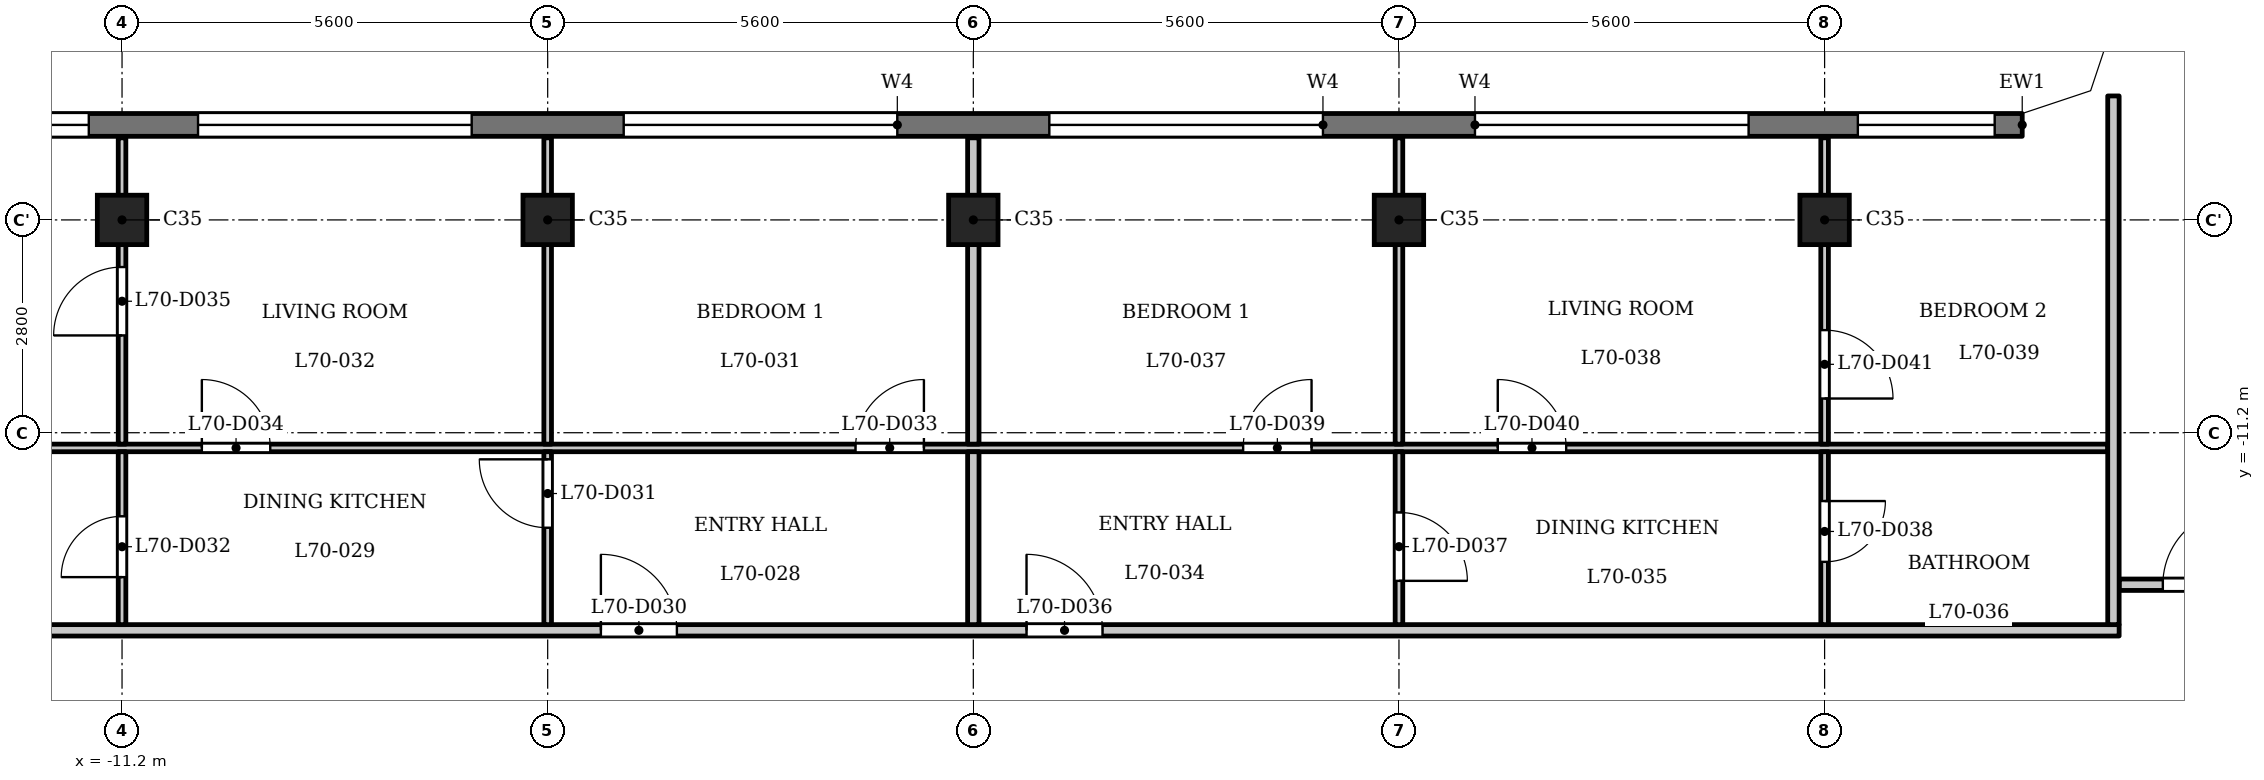
"""IFC4 building model, lengths in metres.
Left out: names, types, materials, properties, quantities, classifications, styles, units other than length and angle.
Written with IfcOpenShell. Run it as: python <this file> out.ifc"""

import sys

from ifc_helpers import new_model, si_unit, direction, frame, frame_2d, origin, origin_2d, place, context, subcontext, project, spatial, polyline, rectangle, outline, extrude, element, fill, save


model = new_model("IFC4")
c1 = context("Model", 3, precision=1e-05, world=origin(), true_north=direction((0.0, 1.0)))
c2 = subcontext(c1, "Body", "Model", "MODEL_VIEW")
j1 = project(units=[si_unit("LENGTHUNIT", "METRE"), si_unit("PLANEANGLEUNIT", "RADIAN")], contexts=[c1])
p1 = place(None, origin())
s1 = spatial("IfcSite", under=j1, at=p1, CompositionType="ELEMENT")
p2 = place(p1, origin())
s2 = spatial("IfcBuilding", under=s1, at=p2, CompositionType="ELEMENT")
p3 = place(p2, frame((0.0, 0.0, 269.7)))
s3 = spatial("IfcBuildingStorey", under=s2, at=p3, CompositionType="ELEMENT", Elevation=269.7)
for number, where, z_axis, x_axis in (
    (1, (-11.2, -8.4, 0.0), (0.0, 0.0, 1.0), (1.0, 0.0, 0.0)),
    (2, (-5.6, -8.4, 0.0), (0.0, 0.0, 1.0), (1.0, 0.0, 0.0)),
    (3, (0.0, -8.4, 0.0), (0.0, 0.0, 1.0), (1.0, 0.0, 0.0)),
    (4, (5.6, -8.4, 0.0), (0.0, 0.0, 1.0), (1.0, 0.0, 0.0)),
    (5, (11.2, -8.4, 0.0), (0.0, 0.0, 1.0), (1.0, 0.0, 0.0)),
):
    element("IfcColumn", number, at=place(p3, frame(where, z_axis=z_axis, x_axis=x_axis)), inside=s3, PredefinedType="COLUMN", context=c2, shape_type="SweptSolid", body=[
        extrude(rectangle(XDim=0.65, YDim=0.65, at=origin_2d()), origin(), (0.0, 0.0, 1.0), 3.5),
    ])
p4 = place(p3, frame((13.8, -7.15, 0.0), z_axis=(0.0, 0.0, 1.0), x_axis=(-1.0, 0.0, 0.0)))
e6 = element("IfcWall", 6, at=p4, inside=s3, PredefinedType="SOLIDWALL", context=c2, shape_type="SweptSolid", body=[
    extrude(rectangle(XDim=27.6, YDim=0.3, at=frame_2d((13.8, 0.0))), origin(), (0.0, 0.0, 1.0), 3.2),
])
p5 = place(p4, frame((0.363, 0.0, 0.9)))
e7 = element("IfcOpeningElement", 7, at=p5, cuts=e6, PredefinedType="OPENING", context=c2, shape_type="SweptSolid", body=[
    extrude(rectangle(XDim=1.8, YDim=1.25, at=frame_2d((0.9, 0.625))), frame((0.0, 0.16, 0.0), z_axis=(0.0, -1.0, 0.0), x_axis=(1.0, 0.0, 0.0)), (0.0, 0.0, 1.0), 0.32),
])
p6 = place(p4, frame((3.6, 0.0, 1.2)))
e8 = element("IfcOpeningElement", 8, at=p6, cuts=e6, PredefinedType="OPENING", context=c2, shape_type="SweptSolid", body=[
    extrude(rectangle(XDim=3.6, YDim=0.95, at=frame_2d((1.8, 0.475))), frame((0.0, 0.16, 0.0), z_axis=(0.0, -1.0, 0.0), x_axis=(1.0, 0.0, 0.0)), (0.0, 0.0, 1.0), 0.32),
])
p7 = place(p4, frame((9.2, 0.0, 1.2)))
e9 = element("IfcOpeningElement", 9, at=p7, cuts=e6, PredefinedType="OPENING", context=c2, shape_type="SweptSolid", body=[
    extrude(rectangle(XDim=3.6, YDim=0.95, at=frame_2d((1.8, 0.475))), frame((0.0, 0.16, 0.0), z_axis=(0.0, -1.0, 0.0), x_axis=(1.0, 0.0, 0.0)), (0.0, 0.0, 1.0), 0.32),
])
p8 = place(p4, frame((14.8, 0.0, 1.2)))
e10 = element("IfcOpeningElement", 10, at=p8, cuts=e6, PredefinedType="OPENING", context=c2, shape_type="SweptSolid", body=[
    extrude(rectangle(XDim=3.6, YDim=0.95, at=frame_2d((1.8, 0.475))), frame((0.0, 0.16, 0.0), z_axis=(0.0, -1.0, 0.0), x_axis=(1.0, 0.0, 0.0)), (0.0, 0.0, 1.0), 0.32),
])
p9 = place(p4, frame((20.4, 0.0, 1.2)))
e11 = element("IfcOpeningElement", 11, at=p9, cuts=e6, PredefinedType="OPENING", context=c2, shape_type="SweptSolid", body=[
    extrude(rectangle(XDim=3.6, YDim=0.95, at=frame_2d((1.8, 0.475))), frame((0.0, 0.16, 0.0), z_axis=(0.0, -1.0, 0.0), x_axis=(1.0, 0.0, 0.0)), (0.0, 0.0, 1.0), 0.32),
])
p10 = place(p4, frame((25.438, 0.0, 0.9)))
e12 = element("IfcOpeningElement", 12, at=p10, cuts=e6, PredefinedType="OPENING", context=c2, shape_type="SweptSolid", body=[
    extrude(rectangle(XDim=1.8, YDim=1.25, at=frame_2d((0.9, 0.625))), frame((0.0, 0.16, 0.0), z_axis=(0.0, -1.0, 0.0), x_axis=(1.0, 0.0, 0.0)), (0.0, 0.0, 1.0), 0.32),
])
p11 = place(p3, frame((-15.075, -13.8, 0.0), z_axis=(0.0, 0.0, 1.0), x_axis=(1.0, 0.0, 0.0)))
e13 = element("IfcWall", 13, at=p11, inside=s3, PredefinedType="PARTITIONING", context=c2, shape_type="SweptSolid", body=[
    extrude(rectangle(XDim=30.15, YDim=0.15, at=frame_2d((15.075, 0.0))), origin(), (0.0, 0.0, 1.0), 3.2),
])
p12 = place(p11, frame((10.175, 0.0, 0.0)))
e14 = element("IfcOpeningElement", 14, at=p12, cuts=e13, PredefinedType="OPENING", context=c2, shape_type="SweptSolid", body=[
    extrude(rectangle(XDim=1.0, YDim=2.1, at=frame_2d((0.5, 1.05))), frame((0.0, 0.085, 0.0), z_axis=(0.0, -1.0, 0.0), x_axis=(1.0, 0.0, 0.0)), (0.0, 0.0, 1.0), 0.17),
])
p13 = place(p11, frame((15.775, 0.0, 0.0)))
e15 = element("IfcOpeningElement", 15, at=p13, cuts=e13, PredefinedType="OPENING", context=c2, shape_type="SweptSolid", body=[
    extrude(rectangle(XDim=1.0, YDim=2.1, at=frame_2d((0.5, 1.05))), frame((0.0, 0.085, 0.0), z_axis=(0.0, -1.0, 0.0), x_axis=(1.0, 0.0, 0.0)), (0.0, 0.0, 1.0), 0.17),
])
p14 = place(p3, frame((15.075, -13.2, 0.0), z_axis=(0.0, 0.0, 1.0), x_axis=(1.0, 0.0, 0.0)))
e16 = element("IfcWall", 16, at=p14, inside=s3, PredefinedType="PARTITIONING", context=c2, shape_type="SweptSolid", body=[
    extrude(rectangle(XDim=2.325, YDim=0.15, at=frame_2d((1.163, 0.0))), origin(), (0.0, 0.0, 1.0), 3.2),
])
p15 = place(p14, frame((0.575, 0.0, 0.0)))
e17 = element("IfcOpeningElement", 17, at=p15, cuts=e16, PredefinedType="OPENING", context=c2, shape_type="SweptSolid", body=[
    extrude(rectangle(XDim=1.0, YDim=2.1, at=frame_2d((0.5, 1.05))), frame((0.0, 0.085, 0.0), z_axis=(0.0, -1.0, 0.0), x_axis=(1.0, 0.0, 0.0)), (0.0, 0.0, 1.0), 0.17),
])
p16 = place(p3, frame((-14.925, -11.4, 0.0), z_axis=(0.0, 0.0, 1.0), x_axis=(1.0, 0.0, 0.0)))
e18 = element("IfcWall", 18, at=p16, inside=s3, PredefinedType="PARTITIONING", context=c2, shape_type="SweptSolid", body=[
    extrude(rectangle(XDim=29.85, YDim=0.1, at=frame_2d((14.925, 0.0))), origin(), (0.0, 0.0, 1.0), 3.2),
])
p17 = place(p16, frame((13.375, 0.0, 0.0)))
e19 = element("IfcOpeningElement", 19, at=p17, cuts=e18, PredefinedType="OPENING", context=c2, shape_type="SweptSolid", body=[
    extrude(rectangle(XDim=0.9, YDim=2.1, at=frame_2d((0.45, 1.05))), frame((0.0, 0.06, 0.0), z_axis=(0.0, -1.0, 0.0), x_axis=(1.0, 0.0, 0.0)), (0.0, 0.0, 1.0), 0.12),
])
p18 = place(p16, frame((4.775, 0.0, 0.0)))
e20 = element("IfcOpeningElement", 20, at=p18, cuts=e18, PredefinedType="OPENING", context=c2, shape_type="SweptSolid", body=[
    extrude(rectangle(XDim=0.9, YDim=2.1, at=frame_2d((0.45, 1.05))), frame((0.0, 0.06, 0.0), z_axis=(0.0, -1.0, 0.0), x_axis=(1.0, 0.0, 0.0)), (0.0, 0.0, 1.0), 0.12),
])
p19 = place(p16, frame((18.475, 0.0, 0.0)))
e21 = element("IfcOpeningElement", 21, at=p19, cuts=e18, PredefinedType="OPENING", context=c2, shape_type="SweptSolid", body=[
    extrude(rectangle(XDim=0.9, YDim=2.1, at=frame_2d((0.45, 1.05))), frame((0.0, 0.06, 0.0), z_axis=(0.0, -1.0, 0.0), x_axis=(1.0, 0.0, 0.0)), (0.0, 0.0, 1.0), 0.12),
])
p20 = place(p16, frame((21.825, 0.0, 0.0)))
e22 = element("IfcOpeningElement", 22, at=p20, cuts=e18, PredefinedType="OPENING", context=c2, shape_type="SweptSolid", body=[
    extrude(rectangle(XDim=0.9, YDim=2.1, at=frame_2d((0.45, 1.05))), frame((0.0, 0.06, 0.0), z_axis=(0.0, -1.0, 0.0), x_axis=(1.0, 0.0, 0.0)), (0.0, 0.0, 1.0), 0.12),
])
p21 = place(p3, frame((-11.2, -13.725, 0.0), z_axis=(0.0, 0.0, 1.0), x_axis=(0.0, 1.0, 0.0)))
e23 = element("IfcWall", 23, at=p21, inside=s3, PredefinedType="PARTITIONING", context=c2, shape_type="SweptSolid", body=[
    extrude(rectangle(XDim=2.275, YDim=0.1, at=frame_2d((1.138, 0.0))), origin(), (0.0, 0.0, 1.0), 3.2),
])
p22 = place(p21, frame((0.625, 0.0, 0.0)))
e24 = element("IfcOpeningElement", 24, at=p22, cuts=e23, PredefinedType="OPENING", context=c2, shape_type="SweptSolid", body=[
    extrude(rectangle(XDim=0.8, YDim=2.1, at=frame_2d((0.4, 1.05))), frame((0.0, 0.06, 0.0), z_axis=(0.0, -1.0, 0.0), x_axis=(1.0, 0.0, 0.0)), (0.0, 0.0, 1.0), 0.12),
])
p23 = place(p3, frame((-11.2, -11.35, 0.0), z_axis=(0.0, 0.0, 1.0), x_axis=(0.0, 1.0, 0.0)))
e25 = element("IfcWall", 25, at=p23, inside=s3, PredefinedType="PARTITIONING", context=c2, shape_type="SweptSolid", body=[
    extrude(rectangle(XDim=4.03, YDim=0.1, at=frame_2d((2.015, 0.0))), origin(), (0.0, 0.0, 1.0), 3.2),
])
p24 = place(p23, frame((1.43, 0.0, 0.0)))
e26 = element("IfcOpeningElement", 26, at=p24, cuts=e25, PredefinedType="OPENING", context=c2, shape_type="SweptSolid", body=[
    extrude(rectangle(XDim=0.9, YDim=2.1, at=frame_2d((0.45, 1.05))), frame((0.0, 0.06, 0.0), z_axis=(0.0, -1.0, 0.0), x_axis=(1.0, 0.0, 0.0)), (0.0, 0.0, 1.0), 0.12),
])
p25 = place(p3, frame((-5.6, -13.725, 0.0), z_axis=(0.0, 0.0, 1.0), x_axis=(0.0, 1.0, 0.0)))
e27 = element("IfcWall", 27, at=p25, inside=s3, PredefinedType="PARTITIONING", context=c2, shape_type="SweptSolid", body=[
    extrude(rectangle(XDim=2.275, YDim=0.1, at=frame_2d((1.138, 0.0))), origin(), (0.0, 0.0, 1.0), 3.2),
])
p26 = place(p25, frame((1.275, 0.0, 0.0)))
e28 = element("IfcOpeningElement", 28, at=p26, cuts=e27, PredefinedType="OPENING", context=c2, shape_type="SweptSolid", body=[
    extrude(rectangle(XDim=0.9, YDim=2.1, at=frame_2d((0.45, 1.05))), frame((0.0, 0.06, 0.0), z_axis=(0.0, -1.0, 0.0), x_axis=(1.0, 0.0, 0.0)), (0.0, 0.0, 1.0), 0.12),
])
p27 = place(p3, frame((-5.6, -11.35, 0.0), z_axis=(0.0, 0.0, 1.0), x_axis=(0.0, 1.0, 0.0)))
e29 = element("IfcWall", 29, at=p27, inside=s3, PredefinedType="PARTITIONING", context=c2, shape_type="SweptSolid", body=[
    extrude(rectangle(XDim=4.03, YDim=0.1, at=frame_2d((2.015, 0.0))), origin(), (0.0, 0.0, 1.0), 3.2),
])
p28 = place(p3, frame((0.0, -13.725, 0.0), z_axis=(0.0, 0.0, 1.0), x_axis=(0.0, 1.0, 0.0)))
e30 = element("IfcWall", 30, at=p28, inside=s3, PredefinedType="PARTITIONING", context=c2, shape_type="SweptSolid", body=[
    extrude(rectangle(XDim=2.275, YDim=0.15, at=frame_2d((1.138, 0.0))), origin(), (0.0, 0.0, 1.0), 3.2),
])
p29 = place(p3, frame((0.0, -11.35, 0.0), z_axis=(0.0, 0.0, 1.0), x_axis=(0.0, 1.0, 0.0)))
e31 = element("IfcWall", 31, at=p29, inside=s3, PredefinedType="PARTITIONING", context=c2, shape_type="SweptSolid", body=[
    extrude(rectangle(XDim=4.03, YDim=0.15, at=frame_2d((2.015, 0.0))), origin(), (0.0, 0.0, 1.0), 3.2),
])
p30 = place(p3, frame((5.6, -13.725, 0.0), z_axis=(0.0, 0.0, 1.0), x_axis=(0.0, 1.0, 0.0)))
e32 = element("IfcWall", 32, at=p30, inside=s3, PredefinedType="PARTITIONING", context=c2, shape_type="SweptSolid", body=[
    extrude(rectangle(XDim=2.275, YDim=0.1, at=frame_2d((1.138, 0.0))), origin(), (0.0, 0.0, 1.0), 3.2),
])
p31 = place(p30, frame((0.576, 0.0, 0.0)))
e33 = element("IfcOpeningElement", 33, at=p31, cuts=e32, PredefinedType="OPENING", context=c2, shape_type="SweptSolid", body=[
    extrude(rectangle(XDim=0.9, YDim=2.1, at=frame_2d((0.45, 1.05))), frame((0.0, 0.06, 0.0), z_axis=(0.0, -1.0, 0.0), x_axis=(1.0, 0.0, 0.0)), (0.0, 0.0, 1.0), 0.12),
])
p32 = place(p3, frame((5.6, -11.35, 0.0), z_axis=(0.0, 0.0, 1.0), x_axis=(0.0, 1.0, 0.0)))
e34 = element("IfcWall", 34, at=p32, inside=s3, PredefinedType="PARTITIONING", context=c2, shape_type="SweptSolid", body=[
    extrude(rectangle(XDim=4.03, YDim=0.1, at=frame_2d((2.015, 0.0))), origin(), (0.0, 0.0, 1.0), 3.2),
])
p33 = place(p3, frame((11.2, -13.725, 0.0), z_axis=(0.0, 0.0, 1.0), x_axis=(0.0, 1.0, 0.0)))
e35 = element("IfcWall", 35, at=p33, inside=s3, PredefinedType="PARTITIONING", context=c2, shape_type="SweptSolid", body=[
    extrude(rectangle(XDim=2.275, YDim=0.1, at=frame_2d((1.138, 0.0))), origin(), (0.0, 0.0, 1.0), 3.2),
])
p34 = place(p33, frame((0.826, 0.0, 0.0)))
e36 = element("IfcOpeningElement", 36, at=p34, cuts=e35, PredefinedType="OPENING", context=c2, shape_type="SweptSolid", body=[
    extrude(rectangle(XDim=0.8, YDim=2.1, at=frame_2d((0.4, 1.05))), frame((0.0, 0.06, 0.0), z_axis=(0.0, -1.0, 0.0), x_axis=(1.0, 0.0, 0.0)), (0.0, 0.0, 1.0), 0.12),
])
p35 = place(p3, frame((11.2, -11.35, 0.0), z_axis=(0.0, 0.0, 1.0), x_axis=(0.0, 1.0, 0.0)))
e37 = element("IfcWall", 37, at=p35, inside=s3, PredefinedType="PARTITIONING", context=c2, shape_type="SweptSolid", body=[
    extrude(rectangle(XDim=4.03, YDim=0.1, at=frame_2d((2.015, 0.0))), origin(), (0.0, 0.0, 1.0), 3.2),
])
p36 = place(p35, frame((0.6, 0.0, 0.0)))
e38 = element("IfcOpeningElement", 38, at=p36, cuts=e37, PredefinedType="OPENING", context=c2, shape_type="SweptSolid", body=[
    extrude(rectangle(XDim=0.9, YDim=2.1, at=frame_2d((0.45, 1.05))), frame((0.0, 0.06, 0.0), z_axis=(0.0, -1.0, 0.0), x_axis=(1.0, 0.0, 0.0)), (0.0, 0.0, 1.0), 0.12),
])
p37 = place(p3, frame((15.0, -13.725, 0.0), z_axis=(0.0, 0.0, 1.0), x_axis=(0.0, 1.0, 0.0)))
e39 = element("IfcWall", 39, at=p37, inside=s3, PredefinedType="PARTITIONING", context=c2, shape_type="SweptSolid", body=[
    extrude(rectangle(XDim=6.956, YDim=0.15, at=frame_2d((3.478, 0.0))), origin(), (0.0, 0.0, 1.0), 3.2),
])
p38 = place(p3, origin())
e40 = element("IfcWall", 40, at=p38, inside=s3, PredefinedType="SOLIDWALL", context=c2, shape_type="SweptSolid", body=[
    extrude(outline(polyline([(14.937, -6.937), (15.3, -5.849), (15.3, -5.8), (15.0, -5.8), (14.7, -6.7), (13.8, -7.0), (13.8, -7.3), (13.849, -7.3), (14.937, -6.937)])), origin(), (0.0, 0.0, 1.0), 3.2),
])
p39 = place(p15, origin())
e41 = element("IfcDoor", 41, at=p39, inside=s3, OperationType="SINGLE_SWING_LEFT", PredefinedType="DOOR", context=c2, shape_type="SweptSolid", body=[
    extrude(rectangle(XDim=1.0, YDim=2.1, at=frame_2d((0.5, 1.05))), frame((0.0, 0.025, 0.0), z_axis=(0.0, -1.0, 0.0), x_axis=(1.0, 0.0, 0.0)), (0.0, 0.0, 1.0), 0.05),
])
fill(e17, e41)
p40 = place(p12, origin())
e42 = element("IfcDoor", 42, at=p40, inside=s3, OperationType="SINGLE_SWING_RIGHT", PredefinedType="DOOR", context=c2, shape_type="SweptSolid", body=[
    extrude(rectangle(XDim=1.0, YDim=2.1, at=frame_2d((0.5, 1.05))), frame((0.0, 0.025, 0.0), z_axis=(0.0, -1.0, 0.0), x_axis=(1.0, 0.0, 0.0)), (0.0, 0.0, 1.0), 0.05),
])
fill(e14, e42)
p41 = place(p26, origin())
e43 = element("IfcDoor", 43, at=p41, inside=s3, OperationType="SINGLE_SWING_LEFT", PredefinedType="DOOR", context=c2, shape_type="SweptSolid", body=[
    extrude(rectangle(XDim=0.9, YDim=2.1, at=frame_2d((0.45, 1.05))), frame((0.0, 0.025, 0.0), z_axis=(0.0, -1.0, 0.0), x_axis=(1.0, 0.0, 0.0)), (0.0, 0.0, 1.0), 0.05),
])
fill(e28, e43)
p42 = place(p22, origin())
e44 = element("IfcDoor", 44, at=p42, inside=s3, OperationType="SINGLE_SWING_RIGHT", PredefinedType="DOOR", context=c2, shape_type="SweptSolid", body=[
    extrude(rectangle(XDim=0.8, YDim=2.1, at=frame_2d((0.4, 1.05))), frame((0.0, 0.025, 0.0), z_axis=(0.0, -1.0, 0.0), x_axis=(1.0, 0.0, 0.0)), (0.0, 0.0, 1.0), 0.05),
])
fill(e24, e44)
p43 = place(p17, origin())
e45 = element("IfcDoor", 45, at=p43, inside=s3, OperationType="SINGLE_SWING_LEFT", PredefinedType="DOOR", context=c2, shape_type="SweptSolid", body=[
    extrude(rectangle(XDim=0.9, YDim=2.1, at=frame_2d((0.45, 1.05))), frame((0.0, 0.025, 0.0), z_axis=(0.0, -1.0, 0.0), x_axis=(1.0, 0.0, 0.0)), (0.0, 0.0, 1.0), 0.05),
])
fill(e19, e45)
p44 = place(p18, origin())
e46 = element("IfcDoor", 46, at=p44, inside=s3, OperationType="SINGLE_SWING_RIGHT", PredefinedType="DOOR", context=c2, shape_type="SweptSolid", body=[
    extrude(rectangle(XDim=0.9, YDim=2.1, at=frame_2d((0.45, 1.05))), frame((0.0, 0.025, 0.0), z_axis=(0.0, -1.0, 0.0), x_axis=(1.0, 0.0, 0.0)), (0.0, 0.0, 1.0), 0.05),
])
fill(e20, e46)
p45 = place(p24, origin())
e47 = element("IfcDoor", 47, at=p45, inside=s3, OperationType="SINGLE_SWING_RIGHT", PredefinedType="DOOR", context=c2, shape_type="SweptSolid", body=[
    extrude(rectangle(XDim=0.9, YDim=2.1, at=frame_2d((0.45, 1.05))), frame((0.0, 0.025, 0.0), z_axis=(0.0, -1.0, 0.0), x_axis=(1.0, 0.0, 0.0)), (0.0, 0.0, 1.0), 0.05),
])
fill(e26, e47)
p46 = place(p13, origin())
e48 = element("IfcDoor", 48, at=p46, inside=s3, OperationType="SINGLE_SWING_RIGHT", PredefinedType="DOOR", context=c2, shape_type="SweptSolid", body=[
    extrude(rectangle(XDim=1.0, YDim=2.1, at=frame_2d((0.5, 1.05))), frame((0.0, 0.025, 0.0), z_axis=(0.0, -1.0, 0.0), x_axis=(1.0, 0.0, 0.0)), (0.0, 0.0, 1.0), 0.05),
])
fill(e15, e48)
p47 = place(p31, origin())
e49 = element("IfcDoor", 49, at=p47, inside=s3, OperationType="SINGLE_SWING_LEFT", PredefinedType="DOOR", context=c2, shape_type="SweptSolid", body=[
    extrude(rectangle(XDim=0.9, YDim=2.1, at=frame_2d((0.45, 1.05))), frame((0.0, 0.025, 0.0), z_axis=(0.0, -1.0, 0.0), x_axis=(1.0, 0.0, 0.0)), (0.0, 0.0, 1.0), 0.05),
])
fill(e33, e49)
p48 = place(p34, origin())
e50 = element("IfcDoor", 50, at=p48, inside=s3, OperationType="SINGLE_SWING_RIGHT", PredefinedType="DOOR", context=c2, shape_type="SweptSolid", body=[
    extrude(rectangle(XDim=0.8, YDim=2.1, at=frame_2d((0.4, 1.05))), frame((0.0, 0.025, 0.0), z_axis=(0.0, -1.0, 0.0), x_axis=(1.0, 0.0, 0.0)), (0.0, 0.0, 1.0), 0.05),
])
fill(e36, e50)
p49 = place(p19, origin())
e51 = element("IfcDoor", 51, at=p49, inside=s3, OperationType="SINGLE_SWING_LEFT", PredefinedType="DOOR", context=c2, shape_type="SweptSolid", body=[
    extrude(rectangle(XDim=0.9, YDim=2.1, at=frame_2d((0.45, 1.05))), frame((0.0, 0.025, 0.0), z_axis=(0.0, -1.0, 0.0), x_axis=(1.0, 0.0, 0.0)), (0.0, 0.0, 1.0), 0.05),
])
fill(e21, e51)
p50 = place(p20, origin())
e52 = element("IfcDoor", 52, at=p50, inside=s3, OperationType="SINGLE_SWING_RIGHT", PredefinedType="DOOR", context=c2, shape_type="SweptSolid", body=[
    extrude(rectangle(XDim=0.9, YDim=2.1, at=frame_2d((0.45, 1.05))), frame((0.0, 0.025, 0.0), z_axis=(0.0, -1.0, 0.0), x_axis=(1.0, 0.0, 0.0)), (0.0, 0.0, 1.0), 0.05),
])
fill(e22, e52)
p51 = place(p36, origin())
e53 = element("IfcDoor", 53, at=p51, inside=s3, OperationType="SINGLE_SWING_LEFT", PredefinedType="DOOR", context=c2, shape_type="SweptSolid", body=[
    extrude(rectangle(XDim=0.9, YDim=2.1, at=frame_2d((0.45, 1.05))), frame((0.0, 0.025, 0.0), z_axis=(0.0, -1.0, 0.0), x_axis=(1.0, 0.0, 0.0)), (0.0, 0.0, 1.0), 0.05),
])
fill(e38, e53)
p52 = place(p5, origin())
e54 = element("IfcWindow", 54, at=p52, inside=s3, PartitioningType="SINGLE_PANEL", PredefinedType="WINDOW", context=c2, shape_type="SweptSolid", body=[
    extrude(rectangle(XDim=1.8, YDim=1.25, at=frame_2d((0.9, 0.625))), frame((0.0, 0.03, 0.0), z_axis=(0.0, -1.0, 0.0), x_axis=(1.0, 0.0, 0.0)), (0.0, 0.0, 1.0), 0.06),
])
fill(e7, e54)
p53 = place(p6, origin())
e55 = element("IfcWindow", 55, at=p53, inside=s3, PartitioningType="SINGLE_PANEL", PredefinedType="WINDOW", context=c2, shape_type="SweptSolid", body=[
    extrude(rectangle(XDim=3.6, YDim=0.95, at=frame_2d((1.8, 0.475))), frame((0.0, 0.03, 0.0), z_axis=(0.0, -1.0, 0.0), x_axis=(1.0, 0.0, 0.0)), (0.0, 0.0, 1.0), 0.06),
])
fill(e8, e55)
p54 = place(p7, origin())
e56 = element("IfcWindow", 56, at=p54, inside=s3, PartitioningType="SINGLE_PANEL", PredefinedType="WINDOW", context=c2, shape_type="SweptSolid", body=[
    extrude(rectangle(XDim=3.6, YDim=0.95, at=frame_2d((1.8, 0.475))), frame((0.0, 0.03, 0.0), z_axis=(0.0, -1.0, 0.0), x_axis=(1.0, 0.0, 0.0)), (0.0, 0.0, 1.0), 0.06),
])
fill(e9, e56)
p55 = place(p8, origin())
e57 = element("IfcWindow", 57, at=p55, inside=s3, PartitioningType="SINGLE_PANEL", PredefinedType="WINDOW", context=c2, shape_type="SweptSolid", body=[
    extrude(rectangle(XDim=3.6, YDim=0.95, at=frame_2d((1.8, 0.475))), frame((0.0, 0.03, 0.0), z_axis=(0.0, -1.0, 0.0), x_axis=(1.0, 0.0, 0.0)), (0.0, 0.0, 1.0), 0.06),
])
fill(e10, e57)
p56 = place(p9, origin())
e58 = element("IfcWindow", 58, at=p56, inside=s3, PartitioningType="SINGLE_PANEL", PredefinedType="WINDOW", context=c2, shape_type="SweptSolid", body=[
    extrude(rectangle(XDim=3.6, YDim=0.95, at=frame_2d((1.8, 0.475))), frame((0.0, 0.03, 0.0), z_axis=(0.0, -1.0, 0.0), x_axis=(1.0, 0.0, 0.0)), (0.0, 0.0, 1.0), 0.06),
])
fill(e11, e58)
p57 = place(p10, origin())
e59 = element("IfcWindow", 59, at=p57, inside=s3, PartitioningType="SINGLE_PANEL", PredefinedType="WINDOW", context=c2, shape_type="SweptSolid", body=[
    extrude(rectangle(XDim=1.8, YDim=1.25, at=frame_2d((0.9, 0.625))), frame((0.0, 0.03, 0.0), z_axis=(0.0, -1.0, 0.0), x_axis=(1.0, 0.0, 0.0)), (0.0, 0.0, 1.0), 0.06),
])
fill(e12, e59)
save(model, sys.argv[1])
